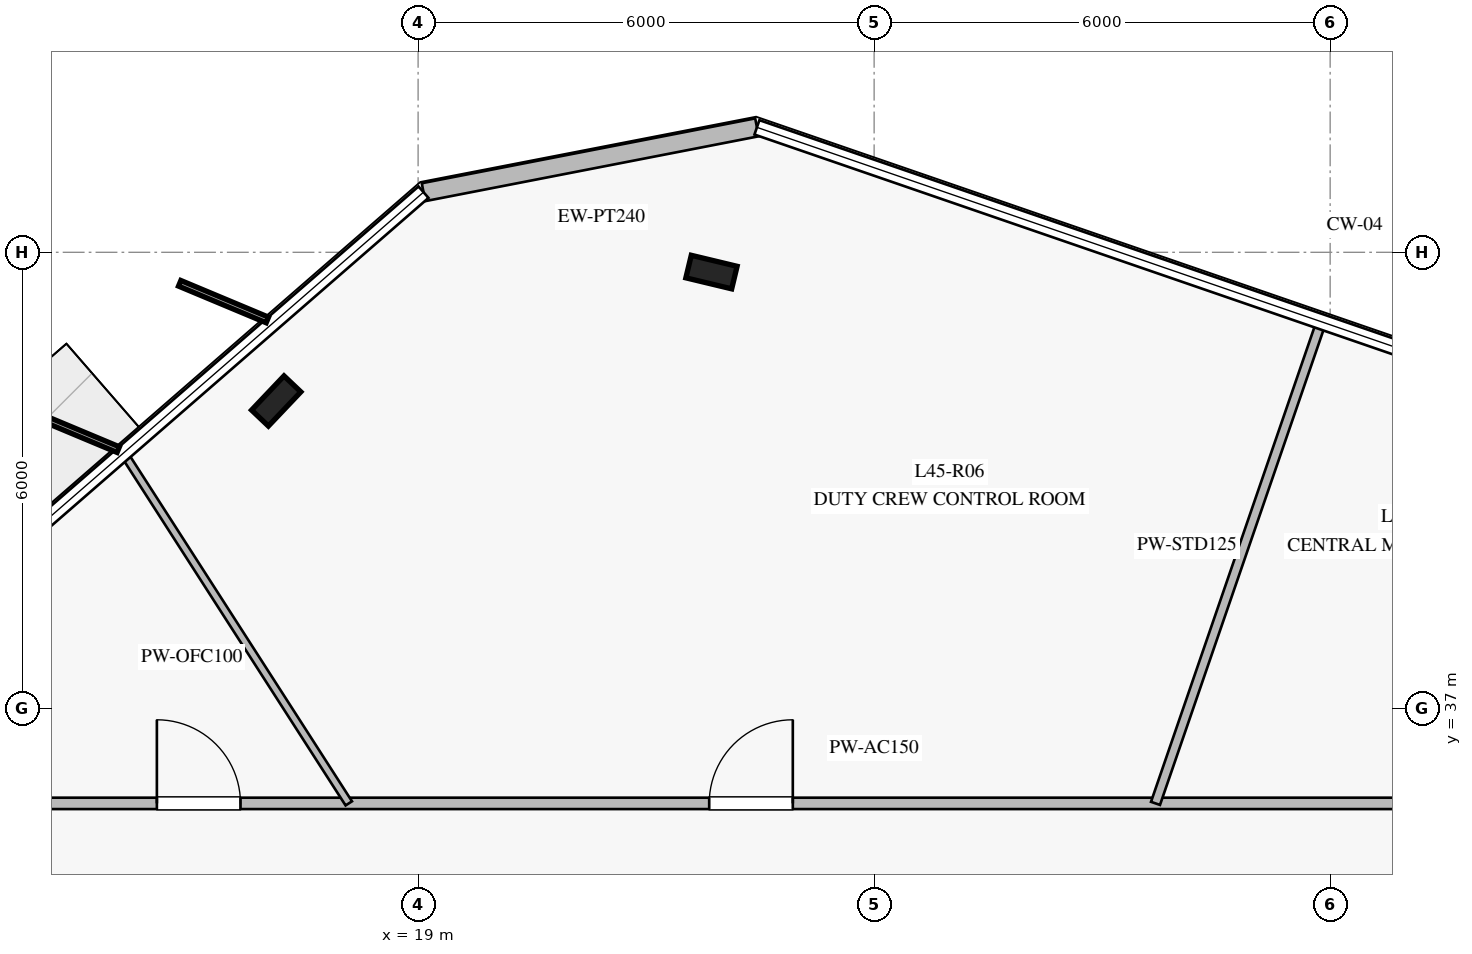
"""IFC4 building model, lengths in metres.
Left out: names, types, materials, properties, quantities, classifications, styles, units other than length and angle.
Written with IfcOpenShell. Run it as: python <this file> out.ifc"""

import sys

from ifc_helpers import new_model, si_unit, direction, frame, frame_2d, origin, origin_2d, place, context, subcontext, project, spatial, rectangle, i_section, extrude, element, fill, save


model = new_model("IFC4")
c1 = context("Model", 3, precision=1e-05, world=origin(), true_north=direction((0.0, 1.0)))
c2 = subcontext(c1, "Body", "Model", "MODEL_VIEW")
j1 = project(units=[si_unit("LENGTHUNIT", "METRE"), si_unit("PLANEANGLEUNIT", "RADIAN")], contexts=[c1])
p1 = place(None, origin())
s1 = spatial("IfcSite", under=j1, at=p1, CompositionType="ELEMENT")
p2 = place(p1, origin())
s2 = spatial("IfcBuilding", under=s1, at=p2, CompositionType="ELEMENT")
p3 = place(p2, frame((0.0, 0.0, 188.8)))
s3 = spatial("IfcBuildingStorey", under=s2, at=p3, CompositionType="ELEMENT", Elevation=188.8)
for number, where, z_axis, x_axis in (
    (1, (22.86, 42.74, 0.0), (0.0, 0.0, 1.0), (-0.972, 0.233, 0.0)),
    (2, (17.133, 41.044, 0.0), (0.0, 0.0, 1.0), (0.688, 0.725, 0.0)),
):
    element("IfcColumn", number, at=place(p3, frame(where, z_axis=z_axis, x_axis=x_axis)), inside=s3, PredefinedType="COLUMN", context=c2, shape_type="SweptSolid", body=[
        extrude(i_section(OverallWidth=0.305, OverallDepth=0.62, WebThickness=0.021, FlangeThickness=0.04, at=origin_2d()), origin(), (0.0, 0.0, 1.0), 4.0),
    ])
p4 = place(p3, frame((23.458, 44.644, 0.0), z_axis=(0.0, 0.0, 1.0), x_axis=(-0.981615105357, -0.190871121271, 0.0)))
e3 = element("IfcWall", 3, at=p4, inside=s3, PredefinedType="STANDARD", context=c2, shape_type="SweptSolid", body=[
    extrude(rectangle(XDim=4.469, YDim=0.24, at=frame_2d((2.235, 0.0))), origin(), (0.0, 0.0, 1.0), 3.78),
])
p5 = place(p3, frame((13.65, 35.75, 0.0), z_axis=(0.0, 0.0, 1.0), x_axis=(1.0, 0.0, 0.0)))
e4 = element("IfcWall", 4, at=p5, inside=s3, PredefinedType="PARTITIONING", context=c2, shape_type="SweptSolid", body=[
    extrude(rectangle(XDim=22.7, YDim=0.15, at=frame_2d((11.35, 0.0))), origin(), (0.0, 0.0, 1.0), 3.05),
])
p6 = place(p5, frame((18.244, 0.0, 0.0)))
e5 = element("IfcOpeningElement", 5, at=p6, cuts=e4, PredefinedType="OPENING", context=c2, shape_type="SweptSolid", body=[
    extrude(rectangle(XDim=1.1, YDim=2.2, at=frame_2d((0.55, 1.1))), frame((0.0, 0.085, 0.0), z_axis=(0.0, -1.0, 0.0), x_axis=(1.0, 0.0, 0.0)), (0.0, 0.0, 1.0), 0.17),
])
p7 = place(p5, frame((9.18, 0.0, 0.0)))
e6 = element("IfcOpeningElement", 6, at=p7, cuts=e4, PredefinedType="OPENING", context=c2, shape_type="SweptSolid", body=[
    extrude(rectangle(XDim=1.1, YDim=2.2, at=frame_2d((0.55, 1.1))), frame((0.0, 0.085, 0.0), z_axis=(0.0, -1.0, 0.0), x_axis=(1.0, 0.0, 0.0)), (0.0, 0.0, 1.0), 0.17),
])
p8 = place(p5, frame((1.913, 0.0, 0.0)))
e7 = element("IfcOpeningElement", 7, at=p8, cuts=e4, PredefinedType="OPENING", context=c2, shape_type="SweptSolid", body=[
    extrude(rectangle(XDim=1.1, YDim=2.2, at=frame_2d((0.55, 1.1))), frame((0.0, 0.085, 0.0), z_axis=(0.0, -1.0, 0.0), x_axis=(1.0, 0.0, 0.0)), (0.0, 0.0, 1.0), 0.17),
])
p9 = place(p3, frame((28.702, 35.75, 0.0), z_axis=(0.0, 0.0, 1.0), x_axis=(0.325503304822, 0.945540902632, 0.0)))
e8 = element("IfcWall", 8, at=p9, inside=s3, PredefinedType="PARTITIONING", context=c2, shape_type="SweptSolid", body=[
    extrude(rectangle(XDim=6.685, YDim=0.125, at=frame_2d((3.343, 0.0))), origin(), (0.0, 0.0, 1.0), 3.05),
])
p10 = place(p3, frame((18.088, 35.75, 0.0), z_axis=(0.0, 0.0, 1.0), x_axis=(-0.540795982474, 0.841153794107, 0.0)))
e9 = element("IfcWall", 9, at=p10, inside=s3, PredefinedType="MOVABLE", context=c2, shape_type="SweptSolid", body=[
    extrude(rectangle(XDim=5.464, YDim=0.1, at=frame_2d((2.732, 0.0))), origin(), (0.0, 0.0, 1.0), 3.18),
])
p11 = place(p7, origin())
e10 = element("IfcDoor", 10, at=p11, inside=s3, OperationType="SINGLE_SWING_RIGHT", PredefinedType="DOOR", context=c2, shape_type="SweptSolid", body=[
    extrude(rectangle(XDim=1.1, YDim=2.2, at=frame_2d((0.55, 1.1))), frame((0.0, 0.025, 0.0), z_axis=(0.0, -1.0, 0.0), x_axis=(1.0, 0.0, 0.0)), (0.0, 0.0, 1.0), 0.05),
])
fill(e6, e10)
p12 = place(p8, origin())
e11 = element("IfcDoor", 11, at=p12, inside=s3, OperationType="SINGLE_SWING_LEFT", PredefinedType="DOOR", context=c2, shape_type="SweptSolid", body=[
    extrude(rectangle(XDim=1.1, YDim=2.2, at=frame_2d((0.55, 1.1))), frame((0.0, 0.025, 0.0), z_axis=(0.0, -1.0, 0.0), x_axis=(1.0, 0.0, 0.0)), (0.0, 0.0, 1.0), 0.05),
])
fill(e7, e11)
save(model, sys.argv[1])
